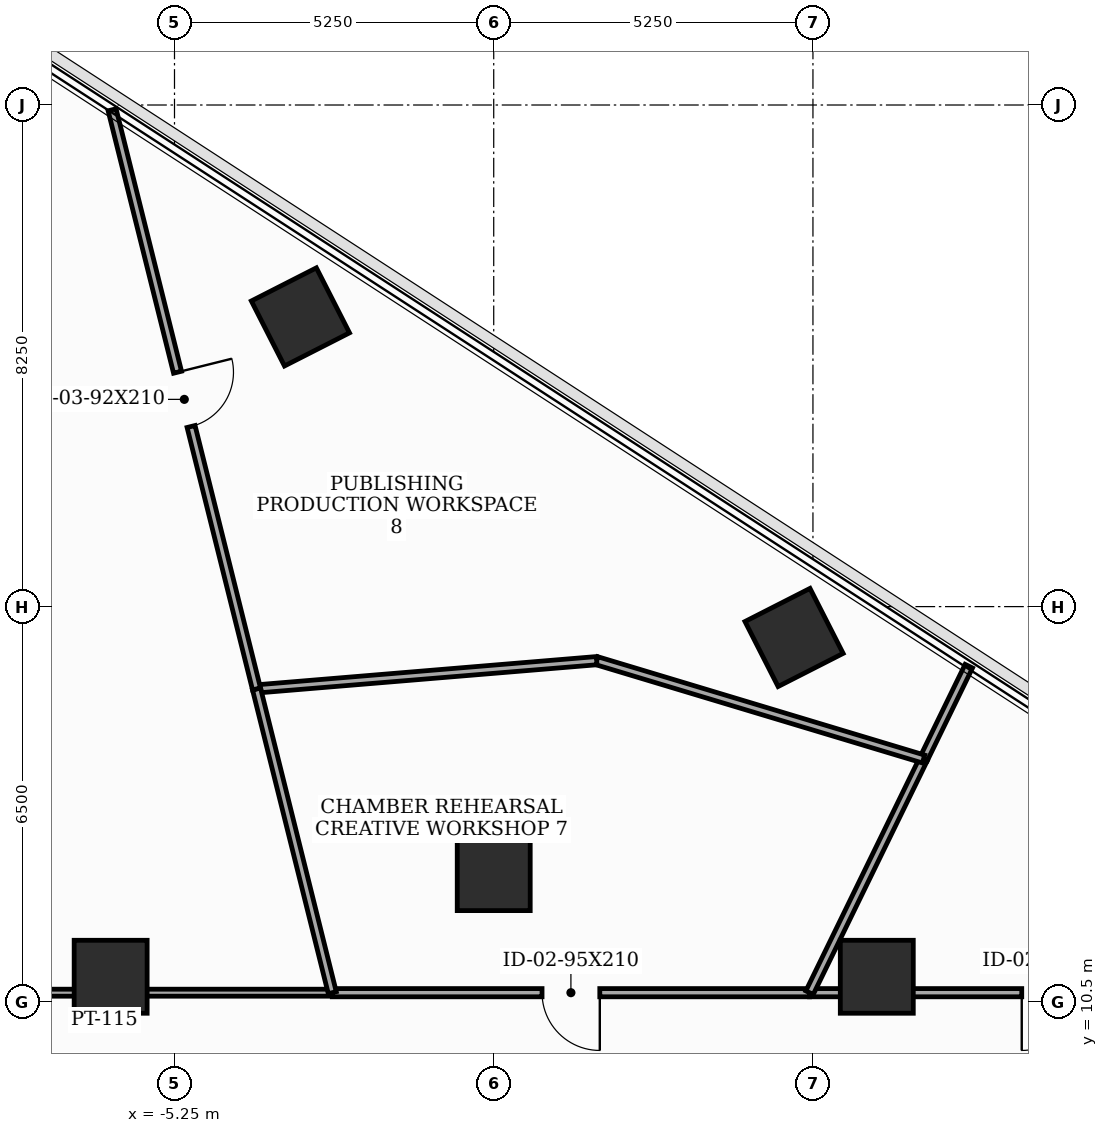
"""IFC4 building model, lengths in metres.
Left out: names, types, materials, properties, quantities, classifications, styles, units other than length and angle.
Written with IfcOpenShell. Run it as: python <this file> out.ifc"""

import sys

from ifc_helpers import new_model, si_unit, direction, frame, frame_2d, origin, origin_2d, place, context, subcontext, project, spatial, rectangle, extrude, element, fill, save


model = new_model("IFC4")
c1 = context("Model", 3, precision=1e-05, world=origin(), true_north=direction((0.0, 1.0)))
c2 = subcontext(c1, "Body", "Model", "MODEL_VIEW")
j1 = project(units=[si_unit("LENGTHUNIT", "METRE"), si_unit("PLANEANGLEUNIT", "RADIAN")], contexts=[c1])
p1 = place(None, origin())
s1 = spatial("IfcSite", under=j1, at=p1, CompositionType="ELEMENT")
p2 = place(p1, origin())
s2 = spatial("IfcBuilding", under=s1, at=p2, CompositionType="ELEMENT")
p3 = place(p2, frame((0.0, 0.0, 138.4)))
s3 = spatial("IfcBuildingStorey", under=s2, at=p3, CompositionType="ELEMENT", Elevation=138.4)
for number, where, z_axis, x_axis in (
    (1, (6.3, 10.912, 0.0), (0.0, 0.0, 1.0), (1.0, 0.0, 0.0)),
    (2, (0.0, 12.6, 0.0), (0.0, 0.0, 1.0), (1.0, 0.0, 0.0)),
    (3, (-6.3, 10.912, 0.0), (0.0, 0.0, 1.0), (1.0, 0.0, 0.0)),
    (4, (4.939, 16.492, 0.0), (0.0, 0.0, 1.0), (0.891, 0.454, 0.0)),
    (5, (-3.179, 21.765, 0.0), (0.0, 0.0, 1.0), (0.891, 0.454, 0.0)),
):
    element("IfcColumn", number, at=place(p3, frame(where, z_axis=z_axis, x_axis=x_axis)), inside=s3, PredefinedType="COLUMN", context=c2, shape_type="SweptSolid", body=[
        extrude(rectangle(XDim=1.2, YDim=1.2, at=origin_2d()), origin(), (0.0, 0.0, 1.0), 3.7),
    ])
p4 = place(p3, frame((10.15, 10.65, 0.0), z_axis=(0.0, 0.0, 1.0), x_axis=(-1.0, 0.0, 0.0)))
e6 = element("IfcWall", 6, at=p4, inside=s3, PredefinedType="PARTITIONING", context=c2, shape_type="SweptSolid", body=[
    extrude(rectangle(XDim=4.956, YDim=0.135, at=frame_2d((2.478, 0.0))), origin(), (0.0, 0.0, 1.0), 2.785),
])
p5 = place(p4, frame((0.516, 0.0, 0.0)))
e7 = element("IfcOpeningElement", 7, at=p5, cuts=e6, PredefinedType="OPENING", context=c2, shape_type="SweptSolid", body=[
    extrude(rectangle(XDim=0.95, YDim=2.1, at=frame_2d((0.475, 1.05))), frame((0.0, 0.077, 0.0), z_axis=(0.0, -1.0, 0.0), x_axis=(1.0, 0.0, 0.0)), (0.0, 0.0, 1.0), 0.155),
])
p6 = place(p3, frame((5.194, 10.65, 0.0), z_axis=(0.0, 0.0, 1.0), x_axis=(-1.0, 0.0, 0.0)))
e8 = element("IfcWall", 8, at=p6, inside=s3, PredefinedType="PARTITIONING", context=c2, shape_type="SweptSolid", body=[
    extrude(rectangle(XDim=7.849, YDim=0.135, at=frame_2d((3.925, 0.0))), origin(), (0.0, 0.0, 1.0), 2.785),
])
p7 = place(p6, frame((3.449, 0.0, 0.0)))
e9 = element("IfcOpeningElement", 9, at=p7, cuts=e8, PredefinedType="OPENING", context=c2, shape_type="SweptSolid", body=[
    extrude(rectangle(XDim=0.95, YDim=2.1, at=frame_2d((0.475, 1.05))), frame((0.0, 0.077, 0.0), z_axis=(0.0, -1.0, 0.0), x_axis=(1.0, 0.0, 0.0)), (0.0, 0.0, 1.0), 0.155),
])
p8 = place(p3, frame((-2.655, 10.65, 0.0), z_axis=(0.0, 0.0, 1.0), x_axis=(-1.0, 0.0, 0.0)))
e10 = element("IfcWall", 10, at=p8, inside=s3, PredefinedType="PARTITIONING", context=c2, shape_type="SweptSolid", body=[
    extrude(rectangle(XDim=7.495, YDim=0.115, at=frame_2d((3.748, 0.0))), origin(), (0.0, 0.0, 1.0), 2.785),
])
p9 = place(p3, frame((7.069, 14.493, 0.0), z_axis=(0.0, 0.0, 1.0), x_axis=(-0.438491124388, -0.898735519401, 0.0)))
e11 = element("IfcWall", 11, at=p9, inside=s3, PredefinedType="PARTITIONING", context=c2, shape_type="SweptSolid", body=[
    extrude(rectangle(XDim=4.276, YDim=0.135, at=frame_2d((2.138, 0.0))), origin(), (0.0, 0.0, 1.0), 2.785),
])
p10 = place(p3, frame((7.813, 16.021, 0.0), z_axis=(0.0, 0.0, 1.0), x_axis=(-0.437939658317, -0.899004369107, 0.0)))
e12 = element("IfcWall", 12, at=p10, inside=s3, PredefinedType="PARTITIONING", context=c2, shape_type="SweptSolid", body=[
    extrude(rectangle(XDim=1.7, YDim=0.135, at=frame_2d((0.85, 0.0))), origin(), (0.0, 0.0, 1.0), 2.985),
])
p11 = place(p3, frame((7.069, 14.493, 0.0), z_axis=(0.0, 0.0, 1.0), x_axis=(-0.957562573124, 0.288225464789, 0.0)))
e13 = element("IfcWall", 13, at=p11, inside=s3, PredefinedType="PARTITIONING", context=c2, shape_type="SweptSolid", body=[
    extrude(rectangle(XDim=5.614, YDim=0.135, at=frame_2d((2.807, 0.0))), origin(), (0.0, 0.0, 1.0), 2.885),
])
p12 = place(p3, frame((1.693, 16.111, 0.0), z_axis=(0.0, 0.0, 1.0), x_axis=(-0.996561637531, -0.082854707786, 0.0)))
e14 = element("IfcWall", 14, at=p12, inside=s3, PredefinedType="PARTITIONING", context=c2, shape_type="SweptSolid", body=[
    extrude(rectangle(XDim=5.613, YDim=0.135, at=frame_2d((2.807, 0.0))), origin(), (0.0, 0.0, 1.0), 2.885),
])
p13 = place(p3, frame((-3.901, 15.646, 0.0), z_axis=(0.0, 0.0, 1.0), x_axis=(0.241955453095, -0.970287358836, 0.0)))
e15 = element("IfcWall", 15, at=p13, inside=s3, PredefinedType="PARTITIONING", context=c2, shape_type="SweptSolid", body=[
    extrude(rectangle(XDim=5.149, YDim=0.135, at=frame_2d((2.575, 0.0))), origin(), (0.0, 0.0, 1.0), 2.785),
])
p14 = place(p3, frame((-6.276, 25.171, 0.0), z_axis=(0.0, 0.0, 1.0), x_axis=(0.241962105276, -0.970285699993, 0.0)))
e16 = element("IfcWall", 16, at=p14, inside=s3, PredefinedType="PARTITIONING", context=c2, shape_type="SweptSolid", body=[
    extrude(rectangle(XDim=9.817, YDim=0.135, at=frame_2d((4.908, 0.0))), origin(), (0.0, 0.0, 1.0), 2.985),
])
p15 = place(p14, frame((4.448, 0.0, 0.0)))
e17 = element("IfcOpeningElement", 17, at=p15, cuts=e16, PredefinedType="OPENING", context=c2, shape_type="SweptSolid", body=[
    extrude(rectangle(XDim=0.92, YDim=2.1, at=frame_2d((0.46, 1.05))), frame((0.0, 0.077, 0.0), z_axis=(0.0, -1.0, 0.0), x_axis=(1.0, 0.0, 0.0)), (0.0, 0.0, 1.0), 0.155),
])
p16 = place(p5, origin())
e18 = element("IfcDoor", 18, at=p16, inside=s3, OperationType="SINGLE_SWING_RIGHT", PredefinedType="DOOR", context=c2, shape_type="SweptSolid", body=[
    extrude(rectangle(XDim=0.95, YDim=2.1, at=frame_2d((0.475, 1.05))), frame((0.0, 0.025, 0.0), z_axis=(0.0, -1.0, 0.0), x_axis=(1.0, 0.0, 0.0)), (0.0, 0.0, 1.0), 0.05),
])
fill(e7, e18)
p17 = place(p7, origin())
e19 = element("IfcDoor", 19, at=p17, inside=s3, OperationType="SINGLE_SWING_LEFT", PredefinedType="DOOR", context=c2, shape_type="SweptSolid", body=[
    extrude(rectangle(XDim=0.95, YDim=2.1, at=frame_2d((0.475, 1.05))), frame((0.0, 0.025, 0.0), z_axis=(0.0, -1.0, 0.0), x_axis=(1.0, 0.0, 0.0)), (0.0, 0.0, 1.0), 0.05),
])
fill(e9, e19)
p18 = place(p15, origin())
e20 = element("IfcDoor", 20, at=p18, inside=s3, OperationType="SINGLE_SWING_LEFT", PredefinedType="DOOR", context=c2, shape_type="SweptSolid", body=[
    extrude(rectangle(XDim=0.92, YDim=2.1, at=frame_2d((0.46, 1.05))), frame((0.0, 0.025, 0.0), z_axis=(0.0, -1.0, 0.0), x_axis=(1.0, 0.0, 0.0)), (0.0, 0.0, 1.0), 0.05),
])
fill(e17, e20)
save(model, sys.argv[1])
